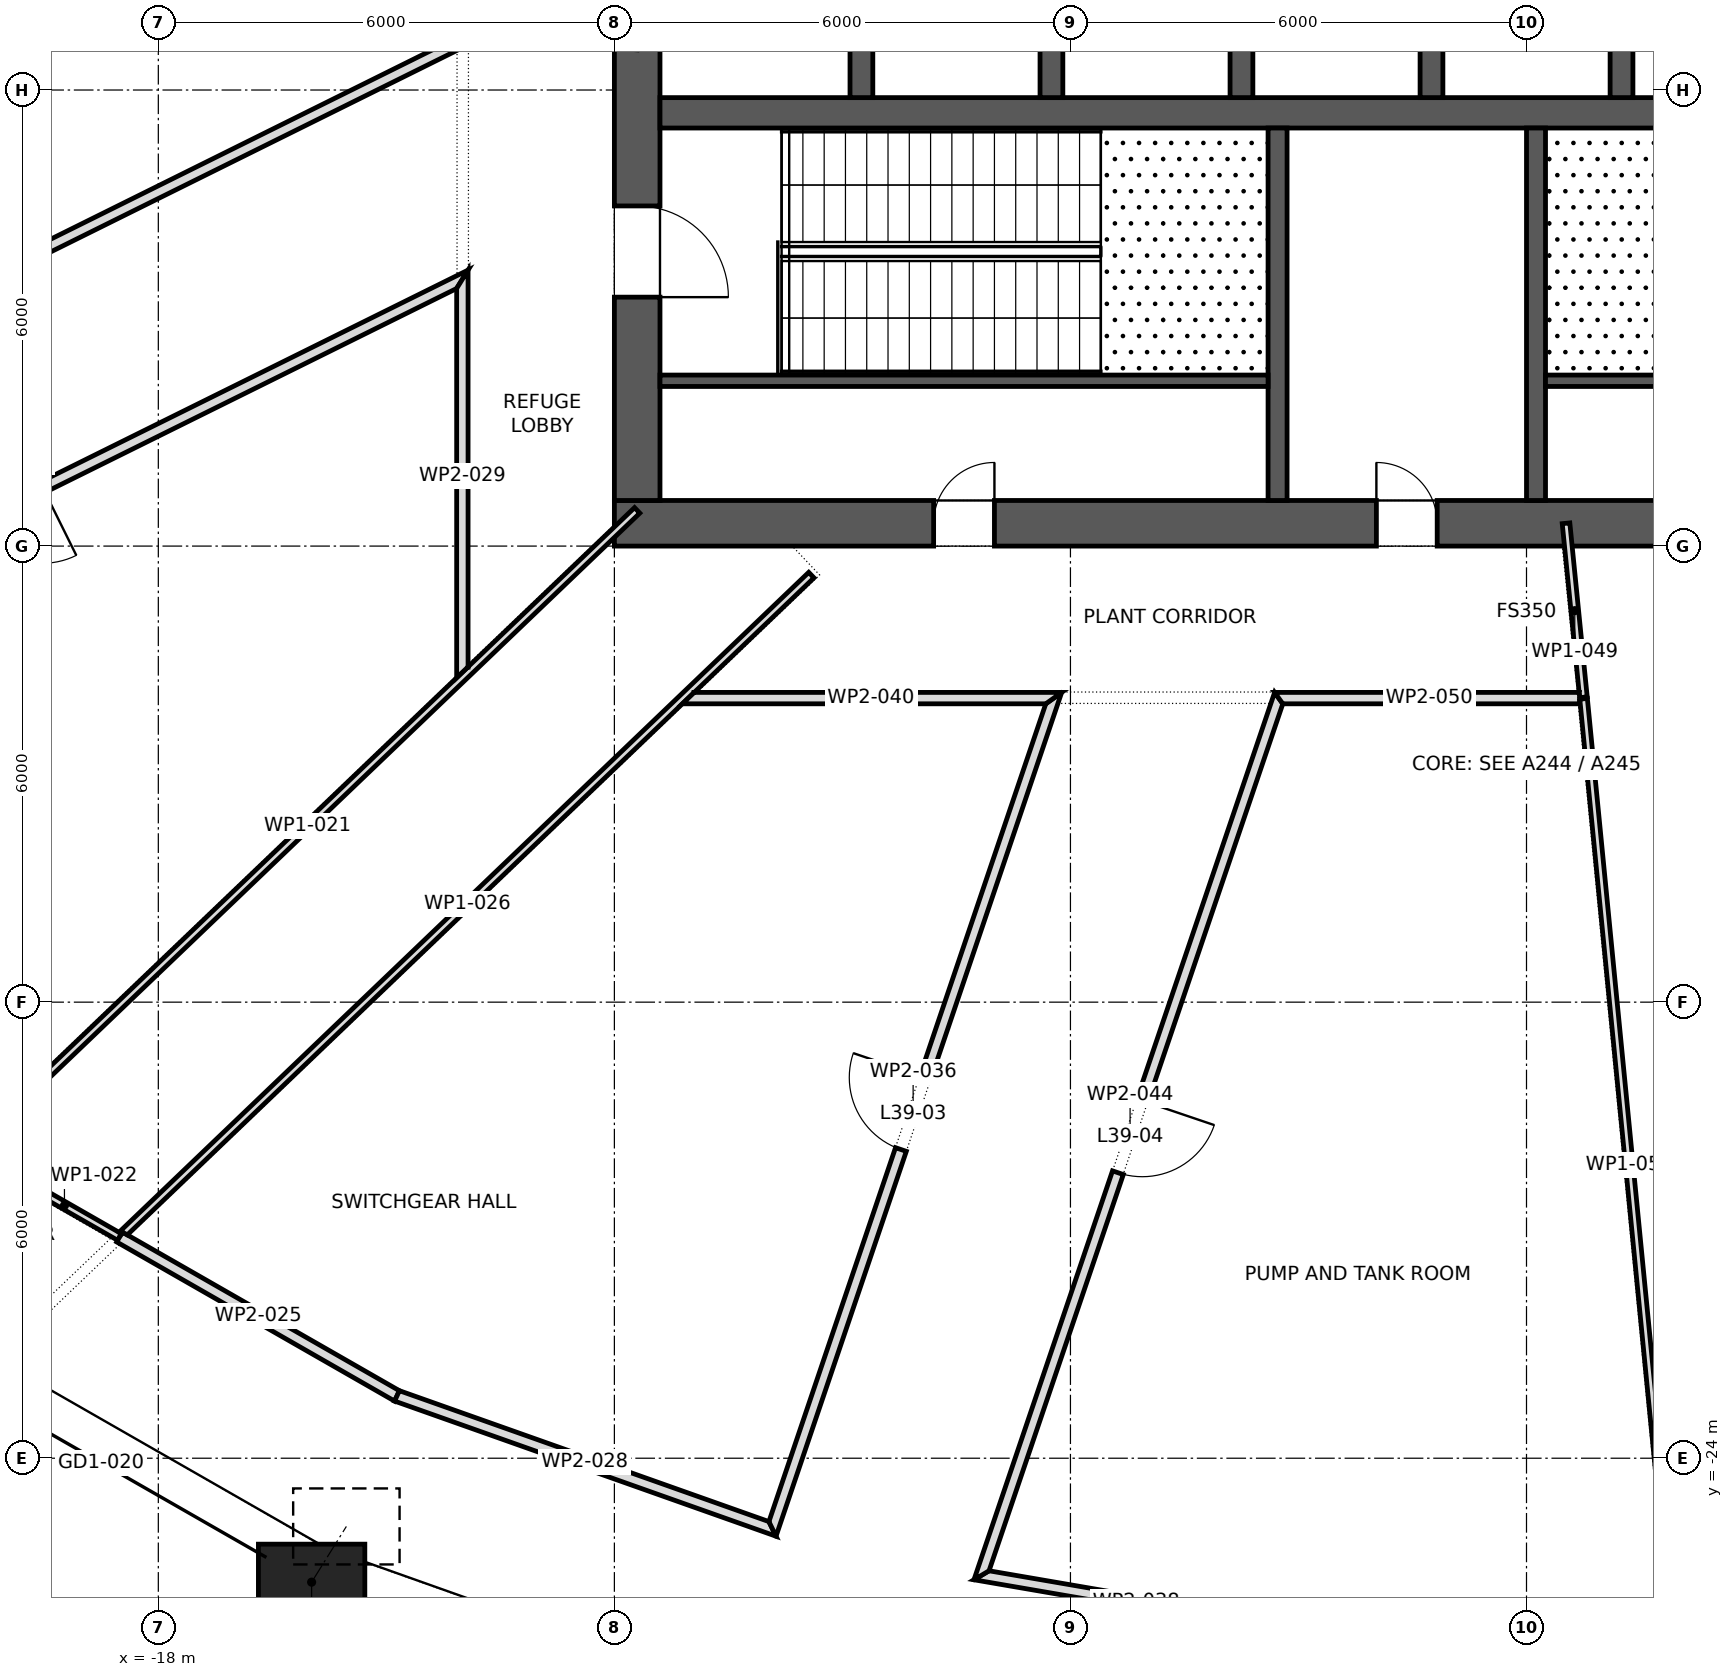
"""IFC4 building model, lengths in metres.
Left out: names, types, materials, properties, quantities, classifications, styles, units other than length and angle.
Written with IfcOpenShell. Run it as: python <this file> out.ifc"""

import sys

from ifc_helpers import new_model, si_unit, direction, frame, frame_2d, origin, origin_2d, place, context, subcontext, project, spatial, polyline, rectangle, outline, extrude, element, fill, save


model = new_model("IFC4")
c1 = context("Model", 3, precision=1e-05, world=origin(), true_north=direction((0.0, 1.0)))
c2 = subcontext(c1, "Body", "Model", "MODEL_VIEW")
j1 = project(units=[si_unit("LENGTHUNIT", "METRE"), si_unit("PLANEANGLEUNIT", "RADIAN")], contexts=[c1])
p1 = place(None, origin())
s1 = spatial("IfcSite", under=j1, at=p1, CompositionType="ELEMENT")
p2 = place(p1, origin())
s2 = spatial("IfcBuilding", under=s1, at=p2, CompositionType="ELEMENT")
p3 = place(p2, frame((0.0, 0.0, 173.5)))
s3 = spatial("IfcBuildingStorey", under=s2, at=p3, CompositionType="ELEMENT", Elevation=173.5)
p4 = place(p3, frame((-15.983, -25.631, 0.081), z_axis=(0.086138821713, 0.138107251256, 0.98666432516), x_axis=(-0.848490015543, 0.529211388316, 0.0)))
e1 = element("IfcColumn", 1, at=p4, inside=s3, PredefinedType="COLUMN", context=c2, shape_type="SweptSolid", body=[
    extrude(rectangle(XDim=1.4, YDim=1.0, at=origin_2d()), origin(), (0.0, 0.0, 1.0), 5.309),
])
p5 = place(p3, frame((-12.0, -11.7, 0.0), z_axis=(0.0, 0.0, 1.0), x_axis=(1.0, 0.0, 0.0)))
e2 = element("IfcWall", 2, at=p5, inside=s3, PredefinedType="SHEAR", context=c2, shape_type="SweptSolid", body=[
    extrude(rectangle(XDim=24.0, YDim=0.6, at=frame_2d((12.0, 0.0))), origin(), (0.0, 0.0, 1.0), 5.4),
])
p6 = place(p5, frame((10.025, 0.0, 0.0)))
e3 = element("IfcOpeningElement", 3, at=p6, cuts=e2, PredefinedType="OPENING", context=c2, shape_type="SweptSolid", body=[
    extrude(rectangle(XDim=0.8, YDim=2.1, at=frame_2d((0.4, 1.05))), frame((0.0, 0.312, 0.0), z_axis=(0.0, -1.0, 0.0), x_axis=(1.0, 0.0, 0.0)), (0.0, 0.0, 1.0), 0.624),
])
p7 = place(p5, frame((4.2, 0.0, 0.0)))
e4 = element("IfcOpeningElement", 4, at=p7, cuts=e2, PredefinedType="OPENING", context=c2, shape_type="SweptSolid", body=[
    extrude(rectangle(XDim=0.8, YDim=2.1, at=frame_2d((0.4, 1.05))), frame((0.0, 0.312, 0.0), z_axis=(0.0, -1.0, 0.0), x_axis=(1.0, 0.0, 0.0)), (0.0, 0.0, 1.0), 0.624),
])
p8 = place(p5, frame((15.85, 0.0, 0.0)))
e5 = element("IfcOpeningElement", 5, at=p8, cuts=e2, PredefinedType="OPENING", context=c2, shape_type="SweptSolid", body=[
    extrude(rectangle(XDim=0.8, YDim=2.1, at=frame_2d((0.4, 1.05))), frame((0.0, 0.312, 0.0), z_axis=(0.0, -1.0, 0.0), x_axis=(1.0, 0.0, 0.0)), (0.0, 0.0, 1.0), 0.624),
])
p9 = place(p3, frame((-11.7, -11.4, 0.0), z_axis=(0.0, 0.0, 1.0), x_axis=(0.0, 1.0, 0.0)))
e6 = element("IfcWall", 6, at=p9, inside=s3, PredefinedType="SHEAR", context=c2, shape_type="SweptSolid", body=[
    extrude(rectangle(XDim=22.8, YDim=0.6, at=frame_2d((11.4, 0.0))), origin(), (0.0, 0.0, 1.0), 5.4),
])
p10 = place(p9, frame((10.2, 0.0, 0.0)))
e7 = element("IfcOpeningElement", 7, at=p10, cuts=e6, PredefinedType="OPENING", context=c2, shape_type="SweptSolid", body=[
    extrude(rectangle(XDim=2.4, YDim=2.1, at=frame_2d((1.2, 1.05))), frame((0.0, 0.312, 0.0), z_axis=(0.0, -1.0, 0.0), x_axis=(1.0, 0.0, 0.0)), (0.0, 0.0, 1.0), 0.624),
])
p11 = place(p9, frame((18.925, 0.0, 0.0)))
e8 = element("IfcOpeningElement", 8, at=p11, cuts=e6, PredefinedType="OPENING", context=c2, shape_type="SweptSolid", body=[
    extrude(rectangle(XDim=1.2, YDim=2.1, at=frame_2d((0.6, 1.05))), frame((0.0, 0.312, 0.0), z_axis=(0.0, -1.0, 0.0), x_axis=(1.0, 0.0, 0.0)), (0.0, 0.0, 1.0), 0.624),
])
p12 = place(p9, frame((2.675, 0.0, 0.0)))
e9 = element("IfcOpeningElement", 9, at=p12, cuts=e6, PredefinedType="OPENING", context=c2, shape_type="SweptSolid", body=[
    extrude(rectangle(XDim=1.2, YDim=2.1, at=frame_2d((0.6, 1.05))), frame((0.0, 0.312, 0.0), z_axis=(0.0, -1.0, 0.0), x_axis=(1.0, 0.0, 0.0)), (0.0, 0.0, 1.0), 0.624),
])
p13 = place(p3, frame((-11.4, -6.3, 0.0), z_axis=(0.0, 0.0, 1.0), x_axis=(1.0, 0.0, 0.0)))
e10 = element("IfcWall", 10, at=p13, inside=s3, PredefinedType="SHEAR", context=c2, shape_type="SweptSolid", body=[
    extrude(rectangle(XDim=22.8, YDim=0.4, at=frame_2d((11.4, 0.0))), origin(), (0.0, 0.0, 1.0), 5.4),
])
p14 = place(p13, frame((20.85, 0.0, 0.0)))
e11 = element("IfcOpeningElement", 11, at=p14, cuts=e10, PredefinedType="OPENING", context=c2, shape_type="SweptSolid", body=[
    extrude(rectangle(XDim=1.1, YDim=2.1, at=frame_2d((0.55, 1.05))), frame((0.0, 0.212, 0.0), z_axis=(0.0, -1.0, 0.0), x_axis=(1.0, 0.0, 0.0)), (0.0, 0.0, 1.0), 0.424),
])
for number, where, z_axis, x_axis in (
    (12, (-8.75, -6.1, 0.0), (0.0, 0.0, 1.0), (0.0, 1.0, 0.0)),
    (13, (-6.25, -6.1, 0.0), (0.0, 0.0, 1.0), (0.0, 1.0, 0.0)),
    (14, (-3.75, -6.1, 0.0), (0.0, 0.0, 1.0), (0.0, 1.0, 0.0)),
    (15, (-1.25, -6.1, 0.0), (0.0, 0.0, 1.0), (0.0, 1.0, 0.0)),
    (16, (1.25, -6.1, 0.0), (0.0, 0.0, 1.0), (0.0, 1.0, 0.0)),
):
    element("IfcWall", number, at=place(p3, frame(where, z_axis=z_axis, x_axis=x_axis)), inside=s3, PredefinedType="SHEAR", context=c2, shape_type="SweptSolid", body=[
        extrude(rectangle(XDim=2.9, YDim=0.3, at=frame_2d((1.45, 0.0))), origin(), (0.0, 0.0, 1.0), 5.4),
    ])
for number, where, z_axis, x_axis in (
    (17, (-3.275, -11.4, 0.0), (0.0, 0.0, 1.0), (0.0, 1.0, 0.0)),
    (18, (0.125, -11.4, 0.0), (0.0, 0.0, 1.0), (0.0, 1.0, 0.0)),
):
    element("IfcWall", number, at=place(p3, frame(where, z_axis=z_axis, x_axis=x_axis)), inside=s3, PredefinedType="SHEAR", context=c2, shape_type="SweptSolid", body=[
        extrude(rectangle(XDim=4.9, YDim=0.25, at=frame_2d((2.45, 0.0))), origin(), (0.0, 0.0, 1.0), 5.1),
    ])
for number, where, z_axis, x_axis in (
    (19, (-11.4, -9.825, 0.0), (0.0, 0.0, 1.0), (1.0, 0.0, 0.0)),
    (20, (0.25, -9.825, 0.0), (0.0, 0.0, 1.0), (1.0, 0.0, 0.0)),
):
    element("IfcWall", number, at=place(p3, frame(where, z_axis=z_axis, x_axis=x_axis)), inside=s3, PredefinedType="SHEAR", context=c2, shape_type="SweptSolid", body=[
        extrude(rectangle(XDim=8.0, YDim=0.15, at=frame_2d((4.0, 0.0))), origin(), (0.0, 0.0, 1.0), 5.1),
    ])
p15 = place(p3, frame((-27.738, -12.174, 0.0), z_axis=(0.0, 0.0, 1.0), x_axis=(0.895862761008, 0.444330860327, 0.0)))
e21 = element("IfcWall", 21, at=p15, inside=s3, PredefinedType="PARTITIONING", context=c2, shape_type="SweptSolid", body=[
    extrude(outline(polyline([(0.0, -0.075), (1.945, -0.075), (3.89, -0.075), (5.835, -0.075), (7.78, -0.075), (9.725, -0.075), (11.67, -0.075), (13.616, -0.075), (15.561, -0.075), (15.305, 0.075), (13.411, 0.075), (11.517, 0.075), (9.623, 0.075), (7.728, 0.075), (5.834, 0.075), (3.94, 0.075), (2.046, 0.075), (0.151, 0.075), (0.151, 0.075), (0.076, 0.0), (0.0, -0.075)])), origin(), (0.0, 0.0, 1.0), 5.1),
])
p16 = place(p3, frame((-26.025, -14.447, 0.0), z_axis=(0.0, 0.0, 1.0), x_axis=(0.896069053311, 0.443914689663, 0.0)))
e22 = element("IfcWall", 22, at=p16, inside=s3, PredefinedType="PARTITIONING", context=c2, shape_type="SweptSolid", body=[
    extrude(outline(polyline([(0.184, -0.075), (2.057, -0.075), (3.931, -0.075), (5.805, -0.075), (7.678, -0.075), (9.552, -0.075), (11.426, -0.075), (13.299, -0.075), (13.541, 0.075), (11.606, 0.075), (9.672, 0.075), (7.738, 0.075), (5.803, 0.075), (3.869, 0.075), (1.935, 0.075), (0.0, 0.075), (0.184, -0.075)])), origin(), (0.0, 0.0, 1.0), 5.1),
])
p17 = place(p16, frame((6.256, 0.0, 0.0)))
e23 = element("IfcOpeningElement", 23, at=p17, cuts=e22, PredefinedType="OPENING", context=c2, shape_type="SweptSolid", body=[
    extrude(rectangle(XDim=1.0, YDim=2.1, at=frame_2d((0.5, 1.05))), frame((0.0, 0.087, 0.0), z_axis=(0.0, -1.0, 0.0), x_axis=(1.0, 0.0, 0.0)), (0.0, 0.0, 1.0), 0.174),
])
p18 = place(p3, frame((-20.379, -19.831, 0.0), z_axis=(0.0, 0.0, 1.0), x_axis=(0.722675408286, 0.691187568073, 0.0)))
e24 = element("IfcWall", 24, at=p18, inside=s3, PredefinedType="PARTITIONING", context=c2, shape_type="SweptSolid", body=[
    extrude(outline(polyline([(12.01, 0.05), (10.495, 0.05), (8.979, 0.05), (8.977, 0.047), (8.974, 0.05), (7.182, 0.05), (5.39, 0.05), (3.598, 0.05), (1.806, 0.05), (0.014, 0.05), (0.019, 0.007), (0.0, 0.006), (0.0, -0.05), (1.716, -0.05), (3.431, -0.05), (5.147, -0.05), (6.863, -0.05), (8.579, -0.05), (10.294, -0.05), (12.01, -0.05), (12.01, 0.05)])), origin(), (0.0, 0.0, 1.0), 5.1),
])
p19 = place(p3, frame((-19.964, -20.258, 0.0), z_axis=(0.0, 0.0, 1.0), x_axis=(0.867893204515, -0.496750828441, 0.0)))
e25 = element("IfcWall", 25, at=p19, inside=s3, PredefinedType="PARTITIONING", context=c2, shape_type="SweptSolid", body=[
    extrude(outline(polyline([(1.676, 0.05), (0.009, 0.05), (0.0, -0.05), (1.676, -0.05), (1.676, 0.05)])), origin(), (0.0, 0.0, 1.0), 5.1),
])
p20 = place(p3, frame((-18.51, -21.09, 0.0), z_axis=(0.0, 0.0, 1.0), x_axis=(0.867822013589, -0.496875188281, 0.0)))
e26 = element("IfcWall", 26, at=p20, inside=s3, PredefinedType="PARTITIONING", context=c2, shape_type="SweptSolid", body=[
    extrude(outline(polyline([(0.0, -0.075), (1.404, -0.075), (2.809, -0.075), (4.213, -0.075), (4.199, 0.075), (2.8, 0.075), (1.4, 0.075), (0.0, 0.075), (0.0, -0.075)])), origin(), (0.0, 0.0, 1.0), 5.1),
])
p21 = place(p3, frame((-18.483, -21.064, 0.0), z_axis=(0.0, 0.0, 1.0), x_axis=(0.722534616371, 0.691334743916, 0.0)))
e27 = element("IfcWall", 27, at=p21, inside=s3, PredefinedType="PARTITIONING", context=c2, shape_type="SweptSolid", body=[
    extrude(outline(polyline([(0.056, -0.05), (1.775, -0.05), (3.495, -0.05), (5.215, -0.05), (6.935, -0.05), (8.655, -0.05), (10.374, -0.05), (10.376, -0.048), (10.379, -0.05), (12.559, -0.05), (12.559, 0.05), (10.765, 0.05), (8.971, 0.05), (7.177, 0.05), (5.383, 0.05), (3.588, 0.05), (1.794, 0.05), (0.0, 0.05), (0.0, 0.05), (0.01, 0.014), (0.0, 0.011), (0.0, 0.011), (0.035, 0.021), (0.056, -0.05)])), origin(), (0.0, 0.0, 1.0), 5.1),
])
p22 = place(p3, frame((-14.866, -23.178, 0.0), z_axis=(0.0, 0.0, 1.0), x_axis=(0.942606176861, -0.333906566786, 0.0)))
e28 = element("IfcWall", 28, at=p22, inside=s3, PredefinedType="PARTITIONING", context=c2, shape_type="SweptSolid", body=[
    extrude(outline(polyline([(0.0, -0.075), (1.775, -0.075), (3.549, -0.075), (5.324, -0.075), (5.172, 0.075), (3.452, 0.075), (1.733, 0.075), (0.014, 0.075), (0.0, -0.075)])), origin(), (0.0, 0.0, 1.0), 5.1),
])
p23 = place(p3, frame((-14.0, -13.732, 0.0), z_axis=(0.0, 0.0, 1.0), x_axis=(0.0, 1.0, 0.0)))
e29 = element("IfcWall", 29, at=p23, inside=s3, PredefinedType="PARTITIONING", context=c2, shape_type="SweptSolid", body=[
    extrude(outline(polyline([(0.144, -0.075), (1.884, -0.075), (3.623, -0.075), (5.363, -0.075), (5.242, 0.0), (5.122, 0.075), (3.415, 0.075), (1.707, 0.075), (0.0, 0.075), (0.144, -0.075)])), origin(), (0.0, 0.0, 1.0), 5.1),
])
p24 = place(p3, frame((-9.944, -25.002, 0.0), z_axis=(0.0, 0.0, 1.0), x_axis=(0.320636430017, 0.947202343613, 0.0)))
e30 = element("IfcWall", 30, at=p24, inside=s3, PredefinedType="PARTITIONING", context=c2, shape_type="SweptSolid", body=[
    extrude(outline(polyline([(0.0, -0.075), (1.953, -0.075), (3.906, -0.075), (5.86, -0.075), (7.813, -0.075), (9.766, -0.075), (11.72, -0.075), (11.511, 0.075), (9.617, 0.075), (7.724, 0.075), (5.831, 0.075), (3.938, 0.075), (2.045, 0.075), (0.152, 0.075), (0.0, -0.075), (0.0, -0.075)])), origin(), (0.0, 0.0, 1.0), 5.1),
])
p25 = place(p24, frame((5.346, 0.0, 0.0)))
e31 = element("IfcOpeningElement", 31, at=p25, cuts=e30, PredefinedType="OPENING", context=c2, shape_type="SweptSolid", body=[
    extrude(rectangle(XDim=1.0, YDim=2.1, at=frame_2d((0.5, 1.05))), frame((0.0, 0.087, 0.0), z_axis=(0.0, -1.0, 0.0), x_axis=(1.0, 0.0, 0.0)), (0.0, 0.0, 1.0), 0.174),
])
p26 = place(p3, frame((-7.257, -25.525, 0.0), z_axis=(0.0, 0.0, 1.0), x_axis=(0.985526115986, -0.16952367006, 0.0)))
e32 = element("IfcWall", 32, at=p26, inside=s3, PredefinedType="PARTITIONING", context=c2, shape_type="SweptSolid", body=[
    extrude(outline(polyline([(4.224, -0.075), (4.224, -0.073), (4.211, 0.075), (2.866, 0.075), (1.521, 0.075), (0.176, 0.075), (0.0, -0.075), (1.408, -0.075), (2.816, -0.075), (4.224, -0.075)])), origin(), (0.0, 0.0, 1.0), 5.1),
])
p27 = place(p3, frame((-6.115, -14.0, 0.0), z_axis=(0.0, 0.0, 1.0), x_axis=(-1.0, 0.0, 0.0)))
e33 = element("IfcWall", 33, at=p27, inside=s3, PredefinedType="PARTITIONING", context=c2, shape_type="SweptSolid", body=[
    extrude(outline(polyline([(0.0, -0.075), (1.611, -0.075), (3.223, -0.075), (4.834, -0.075), (4.99, 0.075), (3.397, 0.075), (1.803, 0.075), (0.209, 0.075), (0.104, 0.0), (0.0, -0.075)])), origin(), (0.0, 0.0, 1.0), 5.1),
])
p28 = place(p3, frame((-3.243, -13.949, 0.0), z_axis=(0.0, 0.0, 1.0), x_axis=(-0.320918229821, -0.947106905142, 0.0)))
e34 = element("IfcWall", 34, at=p28, inside=s3, PredefinedType="PARTITIONING", context=c2, shape_type="SweptSolid", body=[
    extrude(outline(polyline([(12.326, -0.075), (12.326, -0.075), (12.15, 0.075), (10.43, 0.075), (8.71, 0.075), (6.989, 0.075), (5.269, 0.075), (3.548, 0.075), (1.828, 0.075), (0.107, 0.075), (0.0, -0.075), (0.0, -0.075), (1.761, -0.075), (3.522, -0.075), (5.282, -0.075), (7.043, -0.075), (8.804, -0.075), (10.565, -0.075), (12.326, -0.075)])), origin(), (0.0, 0.0, 1.0), 5.1),
])
p29 = place(p28, frame((5.646, 0.0, 0.0)))
e35 = element("IfcOpeningElement", 35, at=p29, cuts=e34, PredefinedType="OPENING", context=c2, shape_type="SweptSolid", body=[
    extrude(rectangle(XDim=1.0, YDim=2.1, at=frame_2d((0.5, 1.05))), frame((0.0, 0.087, 0.0), z_axis=(0.0, -1.0, 0.0), x_axis=(1.0, 0.0, 0.0)), (0.0, 0.0, 1.0), 0.174),
])
p30 = place(p3, frame((0.52, -11.7, 0.0), z_axis=(0.0, 0.0, 1.0), x_axis=(0.099535104197, -0.995034051192, 0.0)))
e36 = element("IfcWall", 36, at=p30, inside=s3, PredefinedType="PARTITIONING", context=c2, shape_type="SweptSolid", body=[
    extrude(outline(polyline([(0.0, -0.05), (2.231, -0.05), (2.231, -0.05), (2.233, -0.05), (2.311, -0.05), (2.311, -0.006), (2.311, 0.05), (0.0, 0.05), (0.0, -0.05)])), origin(), (0.0, 0.0, 1.0), 5.1),
])
p31 = place(p3, frame((0.707, -14.0, 0.0), z_axis=(0.0, 0.0, 1.0), x_axis=(-1.0, 0.0, 0.0)))
e37 = element("IfcWall", 37, at=p31, inside=s3, PredefinedType="PARTITIONING", context=c2, shape_type="SweptSolid", body=[
    extrude(outline(polyline([(4.021, -0.075), (4.021, -0.075), (3.967, 0.0), (3.913, 0.075), (1.957, 0.075), (0.0, 0.075), (0.0, 0.074), (0.007, 0.004), (0.007, 0.004), (0.015, -0.075), (1.35, -0.075), (2.685, -0.075), (4.021, -0.075)])), origin(), (0.0, 0.0, 1.0), 5.1),
])
p32 = place(p3, frame((0.75, -13.999, 0.0), z_axis=(0.0, 0.0, 1.0), x_axis=(0.097559905923, -0.995229654279, 0.0)))
e38 = element("IfcWall", 38, at=p32, inside=s3, PredefinedType="PARTITIONING", context=c2, shape_type="SweptSolid", body=[
    extrude(rectangle(XDim=12.35, YDim=0.1, at=frame_2d((6.175, 0.0))), origin(), (0.0, 0.0, 1.0), 5.1),
])
p33 = place(p12, frame((1.2, 0.0, 0.0), z_axis=(0.0, 0.0, 1.0), x_axis=(-1.0, 0.0, 0.0)))
e39 = element("IfcDoor", 39, at=p33, inside=s3, OperationType="SINGLE_SWING_LEFT", PredefinedType="DOOR", context=c2, shape_type="SweptSolid", body=[
    extrude(rectangle(XDim=1.2, YDim=2.1, at=frame_2d((0.6, 1.05))), frame((0.0, 0.025, 0.0), z_axis=(0.0, -1.0, 0.0), x_axis=(1.0, 0.0, 0.0)), (0.0, 0.0, 1.0), 0.05),
])
fill(e9, e39)
p34 = place(p6, origin())
e40 = element("IfcDoor", 40, at=p34, inside=s3, OperationType="SINGLE_SWING_RIGHT", PredefinedType="DOOR", context=c2, shape_type="SweptSolid", body=[
    extrude(rectangle(XDim=0.8, YDim=2.1, at=frame_2d((0.4, 1.05))), frame((0.0, 0.025, 0.0), z_axis=(0.0, -1.0, 0.0), x_axis=(1.0, 0.0, 0.0)), (0.0, 0.0, 1.0), 0.05),
])
fill(e3, e40)
p35 = place(p7, origin())
e41 = element("IfcDoor", 41, at=p35, inside=s3, OperationType="SINGLE_SWING_LEFT", PredefinedType="DOOR", context=c2, shape_type="SweptSolid", body=[
    extrude(rectangle(XDim=0.8, YDim=2.1, at=frame_2d((0.4, 1.05))), frame((0.0, 0.025, 0.0), z_axis=(0.0, -1.0, 0.0), x_axis=(1.0, 0.0, 0.0)), (0.0, 0.0, 1.0), 0.05),
])
fill(e4, e41)
p36 = place(p25, origin())
e42 = element("IfcDoor", 42, at=p36, inside=s3, OperationType="SINGLE_SWING_LEFT", PredefinedType="DOOR", context=c2, shape_type="SweptSolid", body=[
    extrude(rectangle(XDim=1.0, YDim=2.1, at=frame_2d((0.5, 1.05))), frame((0.0, 0.025, 0.0), z_axis=(0.0, -1.0, 0.0), x_axis=(1.0, 0.0, 0.0)), (0.0, 0.0, 1.0), 0.05),
])
fill(e31, e42)
p37 = place(p29, origin())
e43 = element("IfcDoor", 43, at=p37, inside=s3, OperationType="SINGLE_SWING_RIGHT", PredefinedType="DOOR", context=c2, shape_type="SweptSolid", body=[
    extrude(rectangle(XDim=1.0, YDim=2.1, at=frame_2d((0.5, 1.05))), frame((0.0, 0.025, 0.0), z_axis=(0.0, -1.0, 0.0), x_axis=(1.0, 0.0, 0.0)), (0.0, 0.0, 1.0), 0.05),
])
fill(e35, e43)
save(model, sys.argv[1])
